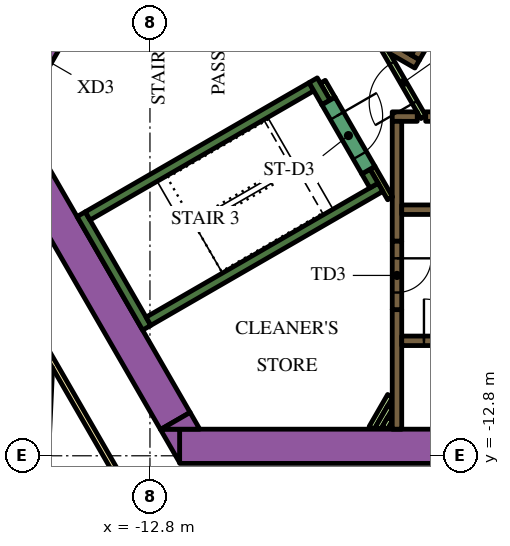
"""IFC4 building model, lengths in metres.
Left out: names, types, materials, properties, quantities, classifications, styles, units other than length and angle.
Written with IfcOpenShell. Run it as: python <this file> out.ifc"""

import sys

from ifc_helpers import new_model, si_unit, direction, frame, frame_2d, origin, place, context, subcontext, project, spatial, polyline, rectangle, outline, extrude, element, fill, save


model = new_model("IFC4")
c1 = context("Model", 3, precision=1e-05, world=origin(), true_north=direction((0.0, 1.0)))
c2 = subcontext(c1, "Body", "Model", "MODEL_VIEW")
j1 = project(units=[si_unit("LENGTHUNIT", "METRE"), si_unit("PLANEANGLEUNIT", "RADIAN")], contexts=[c1])
p1 = place(None, origin())
s1 = spatial("IfcSite", under=j1, at=p1, CompositionType="ELEMENT")
p2 = place(p1, origin())
s2 = spatial("IfcBuilding", under=s1, at=p2, CompositionType="ELEMENT")
p3 = place(p2, frame((0.0, 0.0, 35.4)))
s3 = spatial("IfcBuildingStorey", under=s2, at=p3, CompositionType="ELEMENT", Elevation=35.4)
p4 = place(p3, frame((-12.019, -12.55, 0.0), z_axis=(0.0, 0.0, 1.0), x_axis=(1.0, 0.0, 0.0)))
e1 = element("IfcWall", 1, at=p4, inside=s3, PredefinedType="SOLIDWALL", context=c2, shape_type="SweptSolid", body=[
    extrude(rectangle(XDim=21.63, YDim=0.9, at=frame_2d((10.815, 0.0))), origin(), (0.0, 0.0, 1.0), 3.9),
])
p5 = place(p3, origin())
e2 = element("IfcWall", 2, at=p5, inside=s3, PredefinedType="SOLIDWALL", context=c2, shape_type="SweptSolid", body=[
    extrude(outline(polyline([(-12.529, -12.1), (-12.021, -12.1), (-12.021, -12.98), (-12.529, -12.1)])), origin(), (0.0, 0.0, 1.0), 3.9),
])
p6 = place(p3, frame((-12.134, -11.883, 0.0), z_axis=(0.0, 0.0, 1.0), x_axis=(-0.500005339912, 0.866022320763, 0.0)))
e3 = element("IfcWall", 3, at=p6, inside=s3, PredefinedType="SOLIDWALL", context=c2, shape_type="SweptSolid", body=[
    extrude(rectangle(XDim=9.488, YDim=0.9, at=frame_2d((4.744, 0.0))), origin(), (0.0, 0.0, 1.0), 3.9),
])
e4 = element("IfcWall", 4, at=p5, inside=s3, PredefinedType="SOLIDWALL", context=c2, shape_type="SweptSolid", body=[
    extrude(outline(polyline([(-11.489, -12.1), (-12.505, -12.1), (-11.743, -11.66), (-11.489, -12.1)])), origin(), (0.0, 0.0, 1.0), 3.9),
])
p7 = place(p3, frame((-12.885, -9.431, 0.0), z_axis=(0.0, 0.0, 1.0), x_axis=(-0.500020560727, 0.866013532718, 0.0)))
e5 = element("IfcWall", 5, at=p7, inside=s3, PredefinedType="SOLIDWALL", context=c2, shape_type="SweptSolid", body=[
    extrude(rectangle(XDim=3.45, YDim=0.25, at=frame_2d((1.725, 0.0))), origin(), (0.0, 0.0, 1.0), 3.9),
])
p8 = place(p3, frame((-14.44, -6.49, 0.0), z_axis=(0.0, 0.0, 1.0), x_axis=(0.866022966069, 0.500004222222, 0.0)))
e6 = element("IfcWall", 6, at=p8, inside=s3, PredefinedType="SOLIDWALL", context=c2, shape_type="SweptSolid", body=[
    extrude(rectangle(XDim=6.8, YDim=0.25, at=frame_2d((3.4, 0.0))), origin(), (0.0, 0.0, 1.0), 3.9),
])
p9 = place(p3, frame((-8.168, -3.503, 0.0), z_axis=(0.0, 0.0, 1.0), x_axis=(-0.499952099219, 0.866053057547, 0.0)))
e7 = element("IfcWall", 7, at=p9, inside=s3, PredefinedType="SOLIDWALL", context=c2, shape_type="SweptSolid", body=[
    extrude(rectangle(XDim=0.675, YDim=0.25, at=frame_2d((0.337, 0.0))), origin(), (0.0, 0.0, 1.0), 3.9),
])
p10 = place(p3, frame((-12.84, -9.261, 0.0), z_axis=(0.0, 0.0, 1.0), x_axis=(0.866016039709, 0.500016218704, 0.0)))
e8 = element("IfcWall", 8, at=p10, inside=s3, PredefinedType="SOLIDWALL", context=c2, shape_type="SweptSolid", body=[
    extrude(rectangle(XDim=7.05, YDim=0.25, at=frame_2d((3.525, 0.0))), origin(), (0.0, 0.0, 1.0), 3.9),
])
p11 = place(p3, frame((-6.905, -5.69, 0.0), z_axis=(0.0, 0.0, 1.0), x_axis=(-0.500402024738, 0.865793170242, 0.0)))
e9 = element("IfcWall", 9, at=p11, inside=s3, PredefinedType="SOLIDWALL", context=c2, shape_type="SweptSolid", body=[
    extrude(rectangle(XDim=0.425, YDim=0.25, at=frame_2d((0.212, 0.0))), origin(), (0.0, 0.0, 1.0), 3.9),
])
p12 = place(p3, frame((-6.3, -12.1, 0.0), z_axis=(0.0, 0.0, 1.0), x_axis=(0.0, 1.0, 0.0)))
e10 = element("IfcWall", 10, at=p12, inside=s3, PredefinedType="SOLIDWALL", context=c2, shape_type="SweptSolid", body=[
    extrude(rectangle(XDim=3.146, YDim=0.25, at=frame_2d((1.573, 0.0))), origin(), (0.0, 0.0, 1.0), 3.9),
])
p13 = place(p3, frame((-5.545, -3.875, 0.0), z_axis=(0.0, 0.0, 1.0), x_axis=(1.0, 0.0, 0.0)))
e11 = element("IfcWall", 11, at=p13, inside=s3, PredefinedType="SOLIDWALL", context=c2, shape_type="SweptSolid", body=[
    extrude(rectangle(XDim=11.97, YDim=0.25, at=frame_2d((5.985, 0.0))), origin(), (0.0, 0.0, 1.0), 3.9),
])
p14 = place(p3, frame((-6.425, -3.875, 0.0), z_axis=(0.0, 0.0, 1.0), x_axis=(1.0, 0.0, 0.0)))
e12 = element("IfcWall", 12, at=p14, inside=s3, PredefinedType="SOLIDWALL", context=c2, shape_type="SweptSolid", body=[
    extrude(rectangle(XDim=0.658, YDim=0.25, at=frame_2d((0.329, 0.0))), origin(), (0.0, 0.0, 1.0), 3.9),
])
p15 = place(p3, frame((-6.3, -4.0, 0.0), z_axis=(0.0, 0.0, 1.0), x_axis=(0.0, -1.0, 0.0)))
e13 = element("IfcWall", 13, at=p15, inside=s3, PredefinedType="SOLIDWALL", context=c2, shape_type="SweptSolid", body=[
    extrude(rectangle(XDim=3.154, YDim=0.25, at=frame_2d((1.577, 0.0))), origin(), (0.0, 0.0, 1.0), 3.9),
])
e14 = element("IfcWall", 14, at=p5, inside=s3, PredefinedType="SOLIDWALL", context=c2, shape_type="SweptSolid", body=[
    extrude(outline(polyline([(-5.922, -2.257), (-5.922, -2.257), (-5.705, -2.382), (-5.83, -2.598), (-6.483, -2.221), (-6.591, -2.033), (-6.591, -2.033), (-6.7, -2.096), (-7.952, -1.373), (-7.827, -1.156), (-5.922, -2.257)])), origin(), (0.0, 0.0, 1.0), 3.9),
])
p16 = place(p3, frame((-6.968, -12.068, 0.0), z_axis=(0.0, 0.0, 1.0), x_axis=(0.49998975084, 0.866031321059, 0.0)))
e15 = element("IfcWall", 15, at=p16, inside=s3, PredefinedType="PARTITIONING", context=c2, shape_type="SweptSolid", body=[
    extrude(rectangle(XDim=0.975, YDim=0.15, at=frame_2d((0.488, 0.0))), origin(), (0.0, 0.0, 1.0), 2.75),
])
p17 = place(p3, frame((-6.794, -12.068, 0.0), z_axis=(0.0, 0.0, 1.0), x_axis=(0.49985693963, 0.866107983974, 0.0)))
e16 = element("IfcWall", 16, at=p17, inside=s3, PredefinedType="PARTITIONING", context=c2, shape_type="SweptSolid", body=[
    extrude(rectangle(XDim=0.629, YDim=0.15, at=frame_2d((0.314, 0.0))), origin(), (0.0, 0.0, 1.0), 2.75),
])
p18 = place(p3, frame((-6.621, -12.068, 0.0), z_axis=(0.0, 0.0, 1.0), x_axis=(0.500046963369, 0.865998287773, 0.0)))
e17 = element("IfcWall", 17, at=p18, inside=s3, PredefinedType="PARTITIONING", context=c2, shape_type="SweptSolid", body=[
    extrude(rectangle(XDim=0.282, YDim=0.15, at=frame_2d((0.141, 0.0))), origin(), (0.0, 0.0, 1.0), 2.75),
])
p19 = place(p3, frame((-6.48, -6.027, 0.0), z_axis=(0.0, 0.0, 1.0), x_axis=(-0.499927229454, 0.866067413802, 0.0)))
e18 = element("IfcWall", 18, at=p19, inside=s3, PredefinedType="PARTITIONING", context=c2, shape_type="SweptSolid", body=[
    extrude(rectangle(XDim=0.929, YDim=0.15, at=frame_2d((0.464, 0.0))), origin(), (0.0, 0.0, 1.0), 3.9),
])
p20 = place(p3, frame((-8.252, -2.958, 0.0), z_axis=(0.0, 0.0, 1.0), x_axis=(0.500174715838, -0.865924508047, 0.0)))
e19 = element("IfcWall", 19, at=p20, inside=s3, PredefinedType="PARTITIONING", context=c2, shape_type="SweptSolid", body=[
    extrude(rectangle(XDim=0.514, YDim=0.15, at=frame_2d((0.257, 0.0))), origin(), (0.0, 0.0, 1.0), 2.75),
])
p21 = place(p3, frame((-6.175, -9.775, 0.0), z_axis=(0.0, 0.0, 1.0), x_axis=(1.0, 0.0, 0.0)))
e20 = element("IfcWall", 20, at=p21, inside=s3, PredefinedType="SOLIDWALL", context=c2, shape_type="SweptSolid", body=[
    extrude(rectangle(XDim=12.35, YDim=0.25, at=frame_2d((6.175, 0.0))), origin(), (0.0, 0.0, 1.0), 3.9),
])
p22 = place(p21, frame((0.585, 0.0, 0.0)))
e21 = element("IfcOpeningElement", 21, at=p22, cuts=e20, PredefinedType="OPENING", context=c2, shape_type="SweptSolid", body=[
    extrude(rectangle(XDim=1.1, YDim=2.1, at=frame_2d((0.55, 1.05))), frame((0.0, 0.135, 0.0), z_axis=(0.0, -1.0, 0.0), x_axis=(1.0, 0.0, 0.0)), (0.0, 0.0, 1.0), 0.27),
])
p23 = place(p21, frame((3.105, 0.0, 0.0)))
e22 = element("IfcOpeningElement", 22, at=p23, cuts=e20, PredefinedType="OPENING", context=c2, shape_type="SweptSolid", body=[
    extrude(rectangle(XDim=1.1, YDim=2.1, at=frame_2d((0.55, 1.05))), frame((0.0, 0.135, 0.0), z_axis=(0.0, -1.0, 0.0), x_axis=(1.0, 0.0, 0.0)), (0.0, 0.0, 1.0), 0.27),
])
p24 = place(p21, frame((5.625, 0.0, 0.0)))
e23 = element("IfcOpeningElement", 23, at=p24, cuts=e20, PredefinedType="OPENING", context=c2, shape_type="SweptSolid", body=[
    extrude(rectangle(XDim=1.1, YDim=2.1, at=frame_2d((0.55, 1.05))), frame((0.0, 0.135, 0.0), z_axis=(0.0, -1.0, 0.0), x_axis=(1.0, 0.0, 0.0)), (0.0, 0.0, 1.0), 0.27),
])
p25 = place(p21, frame((8.145, 0.0, 0.0)))
e24 = element("IfcOpeningElement", 24, at=p25, cuts=e20, PredefinedType="OPENING", context=c2, shape_type="SweptSolid", body=[
    extrude(rectangle(XDim=1.1, YDim=2.1, at=frame_2d((0.55, 1.05))), frame((0.0, 0.135, 0.0), z_axis=(0.0, -1.0, 0.0), x_axis=(1.0, 0.0, 0.0)), (0.0, 0.0, 1.0), 0.27),
])
p26 = place(p21, frame((10.665, 0.0, 0.0)))
e25 = element("IfcOpeningElement", 25, at=p26, cuts=e20, PredefinedType="OPENING", context=c2, shape_type="SweptSolid", body=[
    extrude(rectangle(XDim=1.1, YDim=2.1, at=frame_2d((0.55, 1.05))), frame((0.0, 0.135, 0.0), z_axis=(0.0, -1.0, 0.0), x_axis=(1.0, 0.0, 0.0)), (0.0, 0.0, 1.0), 0.27),
])
p27 = place(p3, frame((-6.175, -6.325, 0.0), z_axis=(0.0, 0.0, 1.0), x_axis=(1.0, 0.0, 0.0)))
e26 = element("IfcWall", 26, at=p27, inside=s3, PredefinedType="SOLIDWALL", context=c2, shape_type="SweptSolid", body=[
    extrude(rectangle(XDim=12.35, YDim=0.25, at=frame_2d((6.175, 0.0))), origin(), (0.0, 0.0, 1.0), 3.9),
])
p28 = place(p27, frame((3.205, 0.0, 0.0)))
e27 = element("IfcOpeningElement", 27, at=p28, cuts=e26, PredefinedType="OPENING", context=c2, shape_type="SweptSolid", body=[
    extrude(rectangle(XDim=0.9, YDim=2.1, at=frame_2d((0.45, 1.05))), frame((0.0, 0.135, 0.0), z_axis=(0.0, -1.0, 0.0), x_axis=(1.0, 0.0, 0.0)), (0.0, 0.0, 1.0), 0.27),
])
p29 = place(p27, frame((8.145, 0.0, 0.0)))
e28 = element("IfcOpeningElement", 28, at=p29, cuts=e26, PredefinedType="OPENING", context=c2, shape_type="SweptSolid", body=[
    extrude(rectangle(XDim=1.1, YDim=2.1, at=frame_2d((0.55, 1.05))), frame((0.0, 0.135, 0.0), z_axis=(0.0, -1.0, 0.0), x_axis=(1.0, 0.0, 0.0)), (0.0, 0.0, 1.0), 0.27),
])
p30 = place(p27, frame((10.665, 0.0, 0.0)))
e29 = element("IfcOpeningElement", 29, at=p30, cuts=e26, PredefinedType="OPENING", context=c2, shape_type="SweptSolid", body=[
    extrude(rectangle(XDim=1.1, YDim=2.1, at=frame_2d((0.55, 1.05))), frame((0.0, 0.135, 0.0), z_axis=(0.0, -1.0, 0.0), x_axis=(1.0, 0.0, 0.0)), (0.0, 0.0, 1.0), 0.27),
])
p31 = place(p3, frame((-0.898, 6.194, 0.0), z_axis=(0.0, 0.0, 1.0), x_axis=(-0.499996202215, -0.866027596426, 0.0)))
e30 = element("IfcWall", 30, at=p31, inside=s3, PredefinedType="SOLIDWALL", context=c2, shape_type="SweptSolid", body=[
    extrude(rectangle(XDim=9.83, YDim=0.25, at=frame_2d((4.915, 0.0))), origin(), (0.0, 0.0, 1.0), 3.9),
])
p32 = place(p31, frame((0.585, 0.0, 0.0)))
e31 = element("IfcOpeningElement", 31, at=p32, cuts=e30, PredefinedType="OPENING", context=c2, shape_type="SweptSolid", body=[
    extrude(rectangle(XDim=1.1, YDim=2.1, at=frame_2d((0.55, 1.05))), frame((0.0, 0.135, 0.0), z_axis=(0.0, -1.0, 0.0), x_axis=(1.0, 0.0, 0.0)), (0.0, 0.0, 1.0), 0.27),
])
p33 = place(p31, frame((3.105, 0.0, 0.0)))
e32 = element("IfcOpeningElement", 32, at=p33, cuts=e30, PredefinedType="OPENING", context=c2, shape_type="SweptSolid", body=[
    extrude(rectangle(XDim=1.1, YDim=2.1, at=frame_2d((0.55, 1.05))), frame((0.0, 0.135, 0.0), z_axis=(0.0, -1.0, 0.0), x_axis=(1.0, 0.0, 0.0)), (0.0, 0.0, 1.0), 0.27),
])
p34 = place(p31, frame((5.625, 0.0, 0.0)))
e33 = element("IfcOpeningElement", 33, at=p34, cuts=e30, PredefinedType="OPENING", context=c2, shape_type="SweptSolid", body=[
    extrude(rectangle(XDim=1.1, YDim=2.1, at=frame_2d((0.55, 1.05))), frame((0.0, 0.135, 0.0), z_axis=(0.0, -1.0, 0.0), x_axis=(1.0, 0.0, 0.0)), (0.0, 0.0, 1.0), 0.27),
])
p35 = place(p31, frame((8.145, 0.0, 0.0)))
e34 = element("IfcOpeningElement", 34, at=p35, cuts=e30, PredefinedType="OPENING", context=c2, shape_type="SweptSolid", body=[
    extrude(rectangle(XDim=1.1, YDim=2.1, at=frame_2d((0.55, 1.05))), frame((0.0, 0.135, 0.0), z_axis=(0.0, -1.0, 0.0), x_axis=(1.0, 0.0, 0.0)), (0.0, 0.0, 1.0), 0.27),
])
p36 = place(p3, frame((-8.103, -3.466, 0.0), z_axis=(0.0, 0.0, 1.0), x_axis=(0.500078061341, -0.865980330357, 0.0)))
e35 = element("IfcWall", 35, at=p36, inside=s3, PredefinedType="SOLIDWALL", context=c2, shape_type="SweptSolid", body=[
    extrude(rectangle(XDim=2.1, YDim=0.4, at=frame_2d((1.05, 0.0))), origin(), (0.0, 0.0, 1.0), 3.9),
])
p37 = place(p36, frame((0.45, 0.0, 0.0)))
e36 = element("IfcOpeningElement", 36, at=p37, cuts=e35, PredefinedType="OPENING", context=c2, shape_type="SweptSolid", body=[
    extrude(rectangle(XDim=1.2, YDim=2.1, at=frame_2d((0.6, 1.05))), frame((0.0, 0.21, 0.0), z_axis=(0.0, -1.0, 0.0), x_axis=(1.0, 0.0, 0.0)), (0.0, 0.0, 1.0), 0.42),
])
p38 = place(p3, frame((-6.3, -7.154, 0.0), z_axis=(0.0, 0.0, 1.0), x_axis=(0.0, -1.0, 0.0)))
e37 = element("IfcWall", 37, at=p38, inside=s3, PredefinedType="SOLIDWALL", context=c2, shape_type="SweptSolid", body=[
    extrude(rectangle(XDim=1.8, YDim=0.25, at=frame_2d((0.9, 0.0))), origin(), (0.0, 0.0, 1.0), 3.9),
])
p39 = place(p38, frame((0.45, 0.0, 0.0)))
e38 = element("IfcOpeningElement", 38, at=p39, cuts=e37, PredefinedType="OPENING", context=c2, shape_type="SweptSolid", body=[
    extrude(rectangle(XDim=0.9, YDim=2.1, at=frame_2d((0.45, 1.05))), frame((0.0, 0.135, 0.0), z_axis=(0.0, -1.0, 0.0), x_axis=(1.0, 0.0, 0.0)), (0.0, 0.0, 1.0), 0.27),
])
p40 = place(p3, frame((-5.606, -3.89, 0.0), z_axis=(0.0, 0.0, 1.0), x_axis=(-0.500027713859, 0.866009402589, 0.0)))
e39 = element("IfcWall", 39, at=p40, inside=s3, PredefinedType="PARTITIONING", context=c2, shape_type="SweptSolid", body=[
    extrude(rectangle(XDim=2.1, YDim=0.15, at=frame_2d((1.05, 0.0))), origin(), (0.0, 0.0, 1.0), 2.75),
])
p41 = place(p40, frame((0.45, 0.0, 0.0)))
e40 = element("IfcOpeningElement", 40, at=p41, cuts=e39, PredefinedType="OPENING", context=c2, shape_type="SweptSolid", body=[
    extrude(rectangle(XDim=1.2, YDim=2.1, at=frame_2d((0.6, 1.05))), frame((0.0, 0.085, 0.0), z_axis=(0.0, -1.0, 0.0), x_axis=(1.0, 0.0, 0.0)), (0.0, 0.0, 1.0), 0.17),
])
p42 = place(p3, frame((-16.209, -2.976, 0.0), z_axis=(0.0, 0.0, 1.0), x_axis=(0.499954529098, 0.86605165483, 0.0)))
e41 = element("IfcWall", 41, at=p42, inside=s3, PredefinedType="SOLIDWALL", context=c2, shape_type="SweptSolid", body=[
    extrude(rectangle(XDim=1.7, YDim=0.9, at=frame_2d((0.85, 0.0))), origin(), (0.0, 0.0, 1.0), 3.9),
])
p43 = place(p42, frame((0.25, 0.0, 0.0)))
e42 = element("IfcOpeningElement", 42, at=p43, cuts=e41, PredefinedType="OPENING", context=c2, shape_type="SweptSolid", body=[
    extrude(rectangle(XDim=1.2, YDim=2.1, at=frame_2d((0.6, 1.05))), frame((0.0, 0.46, 0.0), z_axis=(0.0, -1.0, 0.0), x_axis=(1.0, 0.0, 0.0)), (0.0, 0.0, 1.0), 0.92),
])
p44 = place(p3, frame((-19.081, -3.9, 0.0), z_axis=(0.0, 0.0, 1.0), x_axis=(0.499998313975, 0.866026377209, 0.0)))
e43 = element("IfcWall", 43, at=p44, inside=s3, PredefinedType="PARTITIONING", context=c2, shape_type="SweptSolid", body=[
    extrude(rectangle(XDim=25.766, YDim=0.15, at=frame_2d((12.883, 0.0))), origin(), (0.0, 0.0, 1.0), 2.75),
])
p45 = place(p44, frame((24.586, 0.0, 0.0)))
e44 = element("IfcOpeningElement", 44, at=p45, cuts=e43, PredefinedType="OPENING", context=c2, shape_type="SweptSolid", body=[
    extrude(rectangle(XDim=1.0, YDim=2.1, at=frame_2d((0.5, 1.05))), frame((0.0, 0.085, 0.0), z_axis=(0.0, -1.0, 0.0), x_axis=(1.0, 0.0, 0.0)), (0.0, 0.0, 1.0), 0.17),
])
p46 = place(p44, frame((16.196, 0.0, 0.0)))
e45 = element("IfcOpeningElement", 45, at=p46, cuts=e43, PredefinedType="OPENING", context=c2, shape_type="SweptSolid", body=[
    extrude(rectangle(XDim=1.0, YDim=2.1, at=frame_2d((0.5, 1.05))), frame((0.0, 0.085, 0.0), z_axis=(0.0, -1.0, 0.0), x_axis=(1.0, 0.0, 0.0)), (0.0, 0.0, 1.0), 0.17),
])
p47 = place(p44, frame((14.789, 0.0, 0.0)))
e46 = element("IfcOpeningElement", 46, at=p47, cuts=e43, PredefinedType="OPENING", context=c2, shape_type="SweptSolid", body=[
    extrude(rectangle(XDim=1.1, YDim=2.1, at=frame_2d((0.55, 1.05))), frame((0.0, 0.085, 0.0), z_axis=(0.0, -1.0, 0.0), x_axis=(1.0, 0.0, 0.0)), (0.0, 0.0, 1.0), 0.17),
])
p48 = place(p44, frame((3.698, 0.0, 0.0)))
e47 = element("IfcOpeningElement", 47, at=p48, cuts=e43, PredefinedType="OPENING", context=c2, shape_type="SweptSolid", body=[
    extrude(rectangle(XDim=1.0, YDim=2.1, at=frame_2d((0.5, 1.05))), frame((0.0, 0.085, 0.0), z_axis=(0.0, -1.0, 0.0), x_axis=(1.0, 0.0, 0.0)), (0.0, 0.0, 1.0), 0.17),
])
p49 = place(p44, frame((1.531, 0.0, 0.0)))
e48 = element("IfcOpeningElement", 48, at=p49, cuts=e43, PredefinedType="OPENING", context=c2, shape_type="SweptSolid", body=[
    extrude(rectangle(XDim=0.9, YDim=2.1, at=frame_2d((0.45, 1.05))), frame((0.0, 0.085, 0.0), z_axis=(0.0, -1.0, 0.0), x_axis=(1.0, 0.0, 0.0)), (0.0, 0.0, 1.0), 0.17),
])
p50 = place(p3, frame((-12.918, -14.575, 0.0), z_axis=(0.0, 0.0, 1.0), x_axis=(-0.500009150678, 0.866020120573, 0.0)))
e49 = element("IfcWall", 49, at=p50, inside=s3, PredefinedType="PARTITIONING", context=c2, shape_type="SweptSolid", body=[
    extrude(rectangle(XDim=5.258, YDim=0.15, at=frame_2d((2.629, 0.0))), origin(), (0.0, 0.0, 1.0), 2.75),
])
p51 = place(p3, frame((-15.973, -22.109, 0.0), z_axis=(0.0, 0.0, 1.0), x_axis=(0.046191717129, 0.998932592955, 0.0)))
e50 = element("IfcWall", 50, at=p51, inside=s3, PredefinedType="PARTITIONING", context=c2, shape_type="SweptSolid", body=[
    extrude(rectangle(XDim=11.638, YDim=0.15, at=frame_2d((5.819, 0.0))), origin(), (0.0, 0.0, 1.0), 2.75),
])
p52 = place(p22, origin())
e51 = element("IfcDoor", 51, at=p52, inside=s3, OperationType="DOUBLE_DOOR_SLIDING", PredefinedType="DOOR", context=c2, shape_type="SweptSolid", body=[
    extrude(rectangle(XDim=1.1, YDim=2.1, at=frame_2d((0.55, 1.05))), frame((0.0, 0.025, 0.0), z_axis=(0.0, -1.0, 0.0), x_axis=(1.0, 0.0, 0.0)), (0.0, 0.0, 1.0), 0.05),
])
fill(e21, e51)
p53 = place(p37, origin())
e52 = element("IfcDoor", 52, at=p53, inside=s3, OperationType="SINGLE_SWING_LEFT", PredefinedType="DOOR", context=c2, shape_type="SweptSolid", body=[
    extrude(rectangle(XDim=1.2, YDim=2.1, at=frame_2d((0.6, 1.05))), frame((0.0, 0.025, 0.0), z_axis=(0.0, -1.0, 0.0), x_axis=(1.0, 0.0, 0.0)), (0.0, 0.0, 1.0), 0.05),
])
fill(e36, e52)
p54 = place(p39, origin())
e53 = element("IfcDoor", 53, at=p54, inside=s3, OperationType="SINGLE_SWING_LEFT", PredefinedType="DOOR", context=c2, shape_type="SweptSolid", body=[
    extrude(rectangle(XDim=0.9, YDim=2.1, at=frame_2d((0.45, 1.05))), frame((0.0, 0.025, 0.0), z_axis=(0.0, -1.0, 0.0), x_axis=(1.0, 0.0, 0.0)), (0.0, 0.0, 1.0), 0.05),
])
fill(e38, e53)
p55 = place(p41, origin())
e54 = element("IfcDoor", 54, at=p55, inside=s3, OperationType="SINGLE_SWING_LEFT", PredefinedType="DOOR", context=c2, shape_type="SweptSolid", body=[
    extrude(rectangle(XDim=1.2, YDim=2.1, at=frame_2d((0.6, 1.05))), frame((0.0, 0.025, 0.0), z_axis=(0.0, -1.0, 0.0), x_axis=(1.0, 0.0, 0.0)), (0.0, 0.0, 1.0), 0.05),
])
fill(e40, e54)
save(model, sys.argv[1])
